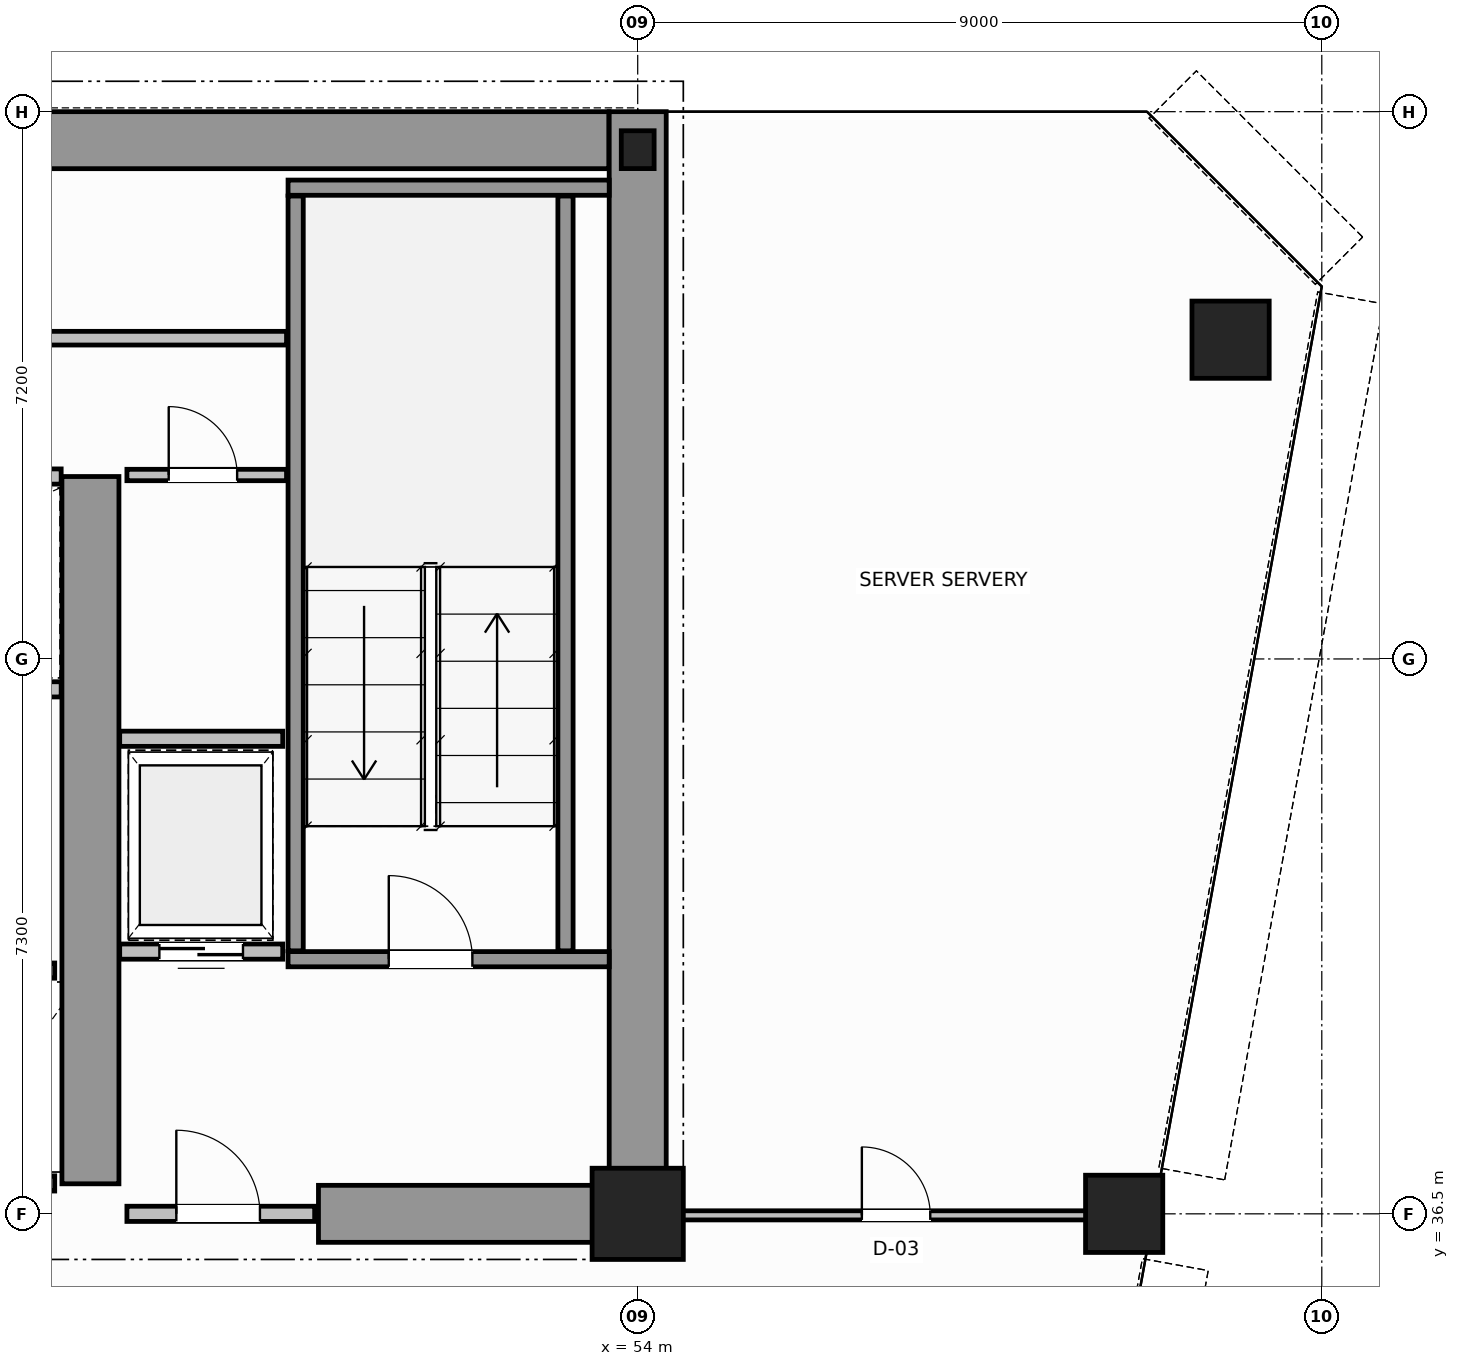
"""IFC4 building model, lengths in metres.
Left out: names, types, materials, properties, quantities, classifications, styles, units other than length and angle.
Written with IfcOpenShell. Run it as: python <this file> out.ifc"""

import sys

from ifc_helpers import new_model, si_unit, direction, frame, frame_2d, origin, origin_2d, place, context, subcontext, project, spatial, rectangle, hollow_circle, i_section, extrude, source, transform, mapped, element, fill, save


model = new_model("IFC4")
c1 = context("Model", 3, precision=1e-05, world=origin(), true_north=direction((0.0, 1.0)))
c2 = subcontext(c1, "Body", "Model", "MODEL_VIEW")
j1 = project(units=[si_unit("LENGTHUNIT", "METRE"), si_unit("PLANEANGLEUNIT", "RADIAN")], contexts=[c1])
p1 = place(None, origin())
s1 = spatial("IfcSite", under=j1, at=p1, CompositionType="ELEMENT")
p2 = place(p1, origin())
s2 = spatial("IfcBuilding", under=s1, at=p2, CompositionType="ELEMENT")
p3 = place(p2, frame((0.0, 0.0, 145.2)))
s3 = spatial("IfcBuildingStorey", under=s2, at=p3, CompositionType="ELEMENT", Elevation=145.2)
m1 = source(origin(), c2, "Body", "SweptSolid", [
    extrude(rectangle(XDim=1.2, YDim=1.2, at=origin_2d()), origin(), (0.0, 0.0, 1.0), 3.8),
])
p4 = place(p3, frame((54.0, 36.5, 0.0), z_axis=(0.0, 0.0, 1.0), x_axis=(1.0, 0.0, 0.0)))
e1 = element("IfcColumn", 1, at=p4, inside=s3, PredefinedType="COLUMN", context=c2, shape_type="MappedRepresentation", body=[
    mapped(m1, transform((0.0, 0.0, 0.0), scale=1.0)),
])
m2 = source(origin(), c2, "Body", "SweptSolid", [
    extrude(i_section(OverallWidth=0.432, OverallDepth=0.498, WebThickness=0.055, FlangeThickness=0.068, FilletRadius=0.015, at=origin_2d()), origin(), (0.0, 0.0, 1.0), 3.8),
])
p5 = place(p3, frame((54.0, 50.5, 0.0), z_axis=(0.0, 0.0, 1.0), x_axis=(1.0, 0.0, 0.0)))
e2 = element("IfcColumn", 2, at=p5, inside=s3, PredefinedType="COLUMN", context=c2, shape_type="MappedRepresentation", body=[
    mapped(m2, transform((0.0, 0.0, 0.0), scale=1.0)),
])
m3 = source(origin(), c2, "Body", "SweptSolid", [
    extrude(hollow_circle(Radius=0.508, WallThickness=0.045, at=origin_2d()), origin(), (0.0, 0.0, 1.0), 3.8),
])
for number, where, z_axis, x_axis in (
    (3, (61.8, 48.0, 0.0), (0.0, 0.0, 1.0), (1.0, 0.0, 0.0)),
    (4, (60.4, 36.5, 0.0), (0.0, 0.0, 1.0), (1.0, 0.0, 0.0)),
):
    element("IfcColumn", number, at=place(p3, frame(where, z_axis=z_axis, x_axis=x_axis)), inside=s3, PredefinedType="COLUMN", context=c2, shape_type="MappedRepresentation", body=[
        mapped(m3, transform((0.0, 0.0, 0.0), scale=1.0)),
    ])
p6 = place(p3, frame((34.002, 50.625, 0.0), z_axis=(0.0, 0.0, 1.0), x_axis=(1.0, 0.0, 0.0)))
e5 = element("IfcWall", 5, at=p6, inside=s3, PredefinedType="SHEAR", context=c2, shape_type="SweptSolid", body=[
    extrude(rectangle(XDim=19.619, YDim=0.75, at=frame_2d((9.81, 0.0))), origin(), (0.0, 0.0, 1.0), 3.8),
])
p7 = place(p3, frame((54.0, 36.5, 0.0), z_axis=(0.0, 0.0, 1.0), x_axis=(0.0, 1.0, 0.0)))
e6 = element("IfcWall", 6, at=p7, inside=s3, PredefinedType="SHEAR", context=c2, shape_type="SweptSolid", body=[
    extrude(rectangle(XDim=14.5, YDim=0.75, at=frame_2d((7.25, 0.0))), origin(), (0.0, 0.0, 1.0), 3.8),
])
p8 = place(p3, frame((49.8, 36.5, 0.0), z_axis=(0.0, 0.0, 1.0), x_axis=(1.0, 0.0, 0.0)))
e7 = element("IfcWall", 7, at=p8, inside=s3, PredefinedType="SHEAR", context=c2, shape_type="SweptSolid", body=[
    extrude(rectangle(XDim=3.805, YDim=0.75, at=frame_2d((1.902, 0.0))), origin(), (0.0, 0.0, 1.0), 2.34),
])
p9 = place(p3, frame((46.8, 36.895, 0.0), z_axis=(0.0, 0.0, 1.0), x_axis=(0.0, 1.0, 0.0)))
e8 = element("IfcWall", 8, at=p9, inside=s3, PredefinedType="SHEAR", context=c2, shape_type="SweptSolid", body=[
    extrude(rectangle(XDim=9.305, YDim=0.75, at=frame_2d((4.652, 0.0))), origin(), (0.0, 0.0, 1.0), 3.8),
])
p10 = place(p3, frame((49.4, 39.85, 0.0), z_axis=(0.0, 0.0, 1.0), x_axis=(1.0, 0.0, 0.0)))
e9 = element("IfcWall", 9, at=p10, inside=s3, PredefinedType="SOLIDWALL", context=c2, shape_type="SweptSolid", body=[
    extrude(rectangle(XDim=4.225, YDim=0.2, at=frame_2d((2.113, 0.0))), origin(), (0.0, 0.0, 1.0), 3.8),
])
p11 = place(p10, frame((1.325, 0.0, 0.0)))
e10 = element("IfcOpeningElement", 10, at=p11, cuts=e9, PredefinedType="OPENING", context=c2, shape_type="SweptSolid", body=[
    extrude(rectangle(XDim=1.1, YDim=2.15, at=frame_2d((0.55, 1.075))), frame((0.0, 0.11, 0.0), z_axis=(0.0, -1.0, 0.0), x_axis=(1.0, 0.0, 0.0)), (0.0, 0.0, 1.0), 0.22),
])
p12 = place(p3, frame((49.4, 50.0, 0.0), z_axis=(0.0, 0.0, 1.0), x_axis=(1.0, 0.0, 0.0)))
e11 = element("IfcWall", 11, at=p12, inside=s3, PredefinedType="SOLIDWALL", context=c2, shape_type="SweptSolid", body=[
    extrude(rectangle(XDim=4.225, YDim=0.2, at=frame_2d((2.113, 0.0))), origin(), (0.0, 0.0, 1.0), 3.8),
])
for number, where, z_axis, x_axis in (
    (12, (49.5, 39.96, 0.0), (0.0, 0.0, 1.0), (0.0, 1.0, 0.0)),
    (13, (53.05, 39.96, 0.0), (0.0, 0.0, 1.0), (0.0, 1.0, 0.0)),
):
    element("IfcWall", number, at=place(p3, frame(where, z_axis=z_axis, x_axis=x_axis)), inside=s3, PredefinedType="SOLIDWALL", context=c2, shape_type="SweptSolid", body=[
        extrude(rectangle(XDim=9.93, YDim=0.2, at=frame_2d((4.965, 0.0))), origin(), (0.0, 0.0, 1.0), 3.8),
    ])
p13 = place(p3, frame((47.28, 36.5, 0.0), z_axis=(0.0, 0.0, 1.0), x_axis=(1.0, 0.0, 0.0)))
e14 = element("IfcWall", 14, at=p13, inside=s3, PredefinedType="SOLIDWALL", context=c2, shape_type="SweptSolid", body=[
    extrude(rectangle(XDim=2.47, YDim=0.2, at=frame_2d((1.235, 0.0))), origin(), (0.0, 0.0, 1.0), 2.33),
])
p14 = place(p13, frame((0.65, 0.0, 0.0)))
e15 = element("IfcOpeningElement", 15, at=p14, cuts=e14, PredefinedType="OPENING", context=c2, shape_type="SweptSolid", body=[
    extrude(rectangle(XDim=1.1, YDim=2.15, at=frame_2d((0.55, 1.075))), frame((0.0, 0.11, 0.0), z_axis=(0.0, -1.0, 0.0), x_axis=(1.0, 0.0, 0.0)), (0.0, 0.0, 1.0), 0.22),
])
p15 = place(p3, frame((44.37, 39.7, 0.0), z_axis=(0.0, 0.0, 1.0), x_axis=(1.0, 0.0, 0.0)))
e16 = element("IfcWall", 16, at=p15, inside=s3, PredefinedType="SOLIDWALL", context=c2, shape_type="SweptSolid", body=[
    extrude(rectangle(XDim=1.96, YDim=0.2, at=frame_2d((0.98, 0.0))), origin(), (0.0, 0.0, 1.0), 3.54),
])
p16 = place(p3, frame((44.37, 36.9, 0.0), z_axis=(0.0, 0.0, 1.0), x_axis=(1.0, 0.0, 0.0)))
e17 = element("IfcWall", 17, at=p16, inside=s3, PredefinedType="SOLIDWALL", context=c2, shape_type="SweptSolid", body=[
    extrude(rectangle(XDim=1.96, YDim=0.2, at=frame_2d((0.98, 0.0))), origin(), (0.0, 0.0, 1.0), 2.33),
])
for number, where, z_axis, x_axis in (
    (18, (44.62, 43.4, 0.0), (0.0, 0.0, 1.0), (1.0, 0.0, 0.0)),
    (19, (44.62, 46.2, 0.0), (0.0, 0.0, 1.0), (1.0, 0.0, 0.0)),
):
    element("IfcWall", number, at=place(p3, frame(where, z_axis=z_axis, x_axis=x_axis)), inside=s3, PredefinedType="SOLIDWALL", context=c2, shape_type="SweptSolid", body=[
        extrude(rectangle(XDim=1.795, YDim=0.2, at=frame_2d((0.897, 0.0))), origin(), (0.0, 0.0, 1.0), 3.54),
    ])
p17 = place(p3, frame((47.185, 39.95, 0.0), z_axis=(0.0, 0.0, 1.0), x_axis=(1.0, 0.0, 0.0)))
e20 = element("IfcWall", 20, at=p17, inside=s3, PredefinedType="SOLIDWALL", context=c2, shape_type="SweptSolid", body=[
    extrude(rectangle(XDim=2.145, YDim=0.2, at=frame_2d((1.073, 0.0))), origin(), (0.0, 0.0, 1.0), 3.54),
])
p18 = place(p17, frame((0.522, 0.0, 0.0)))
e21 = element("IfcOpeningElement", 21, at=p18, cuts=e20, PredefinedType="OPENING", context=c2, shape_type="SweptSolid", body=[
    extrude(rectangle(XDim=1.1, YDim=2.15, at=frame_2d((0.55, 1.075))), frame((0.0, 0.11, 0.0), z_axis=(0.0, -1.0, 0.0), x_axis=(1.0, 0.0, 0.0)), (0.0, 0.0, 1.0), 0.22),
])
p19 = place(p3, frame((47.185, 42.75, 0.0), z_axis=(0.0, 0.0, 1.0), x_axis=(1.0, 0.0, 0.0)))
e22 = element("IfcWall", 22, at=p19, inside=s3, PredefinedType="SOLIDWALL", context=c2, shape_type="SweptSolid", body=[
    extrude(rectangle(XDim=2.145, YDim=0.2, at=frame_2d((1.073, 0.0))), origin(), (0.0, 0.0, 1.0), 3.54),
])
p20 = place(p3, frame((47.28, 46.22, 0.0), z_axis=(0.0, 0.0, 1.0), x_axis=(1.0, 0.0, 0.0)))
e23 = element("IfcWall", 23, at=p20, inside=s3, PredefinedType="PARTITIONING", context=c2, shape_type="SweptSolid", body=[
    extrude(rectangle(XDim=2.1, YDim=0.15, at=frame_2d((1.05, 0.0))), origin(), (0.0, 0.0, 1.0), 3.54),
])
p21 = place(p20, frame((0.55, 0.0, 0.0)))
e24 = element("IfcOpeningElement", 24, at=p21, cuts=e23, PredefinedType="OPENING", context=c2, shape_type="SweptSolid", body=[
    extrude(rectangle(XDim=0.9, YDim=2.1, at=frame_2d((0.45, 1.05))), frame((0.0, 0.085, 0.0), z_axis=(0.0, -1.0, 0.0), x_axis=(1.0, 0.0, 0.0)), (0.0, 0.0, 1.0), 0.17),
])
p22 = place(p3, frame((18.62, 48.02, 0.0), z_axis=(0.0, 0.0, 1.0), x_axis=(1.0, 0.0, 0.0)))
e25 = element("IfcWall", 25, at=p22, inside=s3, PredefinedType="PLUMBINGWALL", context=c2, shape_type="SweptSolid", body=[
    extrude(rectangle(XDim=30.76, YDim=0.18, at=frame_2d((15.38, 0.0))), origin(), (0.0, 0.0, 1.0), 3.54),
])
p23 = place(p22, frame((1.955, 0.0, 0.0)))
e26 = element("IfcOpeningElement", 26, at=p23, cuts=e25, PredefinedType="OPENING", context=c2, shape_type="SweptSolid", body=[
    extrude(rectangle(XDim=0.9, YDim=2.15, at=frame_2d((0.45, 1.075))), frame((0.0, 0.1, 0.0), z_axis=(0.0, -1.0, 0.0), x_axis=(1.0, 0.0, 0.0)), (0.0, 0.0, 1.0), 0.2),
])
p24 = place(p22, frame((8.03, 0.0, 0.0)))
e27 = element("IfcOpeningElement", 27, at=p24, cuts=e25, PredefinedType="OPENING", context=c2, shape_type="SweptSolid", body=[
    extrude(rectangle(XDim=0.9, YDim=2.15, at=frame_2d((0.45, 1.075))), frame((0.0, 0.1, 0.0), z_axis=(0.0, -1.0, 0.0), x_axis=(1.0, 0.0, 0.0)), (0.0, 0.0, 1.0), 0.2),
])
p25 = place(p22, frame((16.93, 0.0, 0.0)))
e28 = element("IfcOpeningElement", 28, at=p25, cuts=e25, PredefinedType="OPENING", context=c2, shape_type="SweptSolid", body=[
    extrude(rectangle(XDim=0.9, YDim=2.15, at=frame_2d((0.45, 1.075))), frame((0.0, 0.1, 0.0), z_axis=(0.0, -1.0, 0.0), x_axis=(1.0, 0.0, 0.0)), (0.0, 0.0, 1.0), 0.2),
])
p26 = place(p22, frame((26.205, 0.0, 0.0)))
e29 = element("IfcOpeningElement", 29, at=p26, cuts=e25, PredefinedType="OPENING", context=c2, shape_type="SweptSolid", body=[
    extrude(rectangle(XDim=0.9, YDim=2.15, at=frame_2d((0.45, 1.075))), frame((0.0, 0.1, 0.0), z_axis=(0.0, -1.0, 0.0), x_axis=(1.0, 0.0, 0.0)), (0.0, 0.0, 1.0), 0.2),
])
p27 = place(p3, frame((54.06, 36.48, 0.0), z_axis=(0.0, 0.0, 1.0), x_axis=(1.0, 0.0, 0.0)))
e30 = element("IfcWall", 30, at=p27, inside=s3, PredefinedType="PARTITIONING", context=c2, shape_type="SweptSolid", body=[
    extrude(rectangle(XDim=6.678, YDim=0.12, at=frame_2d((3.339, 0.0))), origin(), (0.0, 0.0, 1.0), 2.83),
])
p28 = place(p27, frame((2.889, 0.0, 0.0)))
e31 = element("IfcOpeningElement", 31, at=p28, cuts=e30, PredefinedType="OPENING", context=c2, shape_type="SweptSolid", body=[
    extrude(rectangle(XDim=0.9, YDim=2.15, at=frame_2d((0.45, 1.075))), frame((0.0, 0.07, 0.0), z_axis=(0.0, -1.0, 0.0), x_axis=(1.0, 0.0, 0.0)), (0.0, 0.0, 1.0), 0.14),
])
m4 = source(origin(), c2, "Body", "SweptSolid", [
    extrude(rectangle(XDim=1.1, YDim=2.15, at=frame_2d((0.55, 1.075))), frame((0.0, 0.025, 0.0), z_axis=(0.0, -1.0, 0.0), x_axis=(1.0, 0.0, 0.0)), (0.0, 0.0, 1.0), 0.05),
])
p29 = place(p11, origin())
e32 = element("IfcDoor", 32, at=p29, inside=s3, OperationType="SINGLE_SWING_RIGHT", PredefinedType="DOOR", context=c2, shape_type="MappedRepresentation", body=[
    mapped(m4, transform((0.0, 0.0, 0.0), scale=1.0)),
])
fill(e10, e32)
p30 = place(p14, origin())
e33 = element("IfcDoor", 33, at=p30, inside=s3, OperationType="SINGLE_SWING_LEFT", PredefinedType="DOOR", context=c2, shape_type="MappedRepresentation", body=[
    mapped(m4, transform((0.0, 0.0, 0.0), scale=1.0)),
])
fill(e15, e33)
p31 = place(p18, origin())
e34 = element("IfcDoor", 34, at=p31, inside=s3, OperationType="DOUBLE_DOOR_SLIDING", PredefinedType="DOOR", context=c2, shape_type="MappedRepresentation", body=[
    mapped(m4, transform((0.0, 0.0, 0.0), scale=1.0)),
])
fill(e21, e34)
m5 = source(origin(), c2, "Body", "SweptSolid", [
    extrude(rectangle(XDim=0.9, YDim=2.1, at=frame_2d((0.45, 1.05))), frame((0.0, 0.025, 0.0), z_axis=(0.0, -1.0, 0.0), x_axis=(1.0, 0.0, 0.0)), (0.0, 0.0, 1.0), 0.05),
])
p32 = place(p21, origin())
e35 = element("IfcDoor", 35, at=p32, inside=s3, OperationType="SINGLE_SWING_RIGHT", PredefinedType="DOOR", context=c2, shape_type="MappedRepresentation", body=[
    mapped(m5, transform((0.0, 0.0, 0.0), scale=1.0)),
])
fill(e24, e35)
m6 = source(origin(), c2, "Body", "SweptSolid", [
    extrude(rectangle(XDim=0.9, YDim=2.15, at=frame_2d((0.45, 1.075))), frame((0.0, 0.025, 0.0), z_axis=(0.0, -1.0, 0.0), x_axis=(1.0, 0.0, 0.0)), (0.0, 0.0, 1.0), 0.05),
])
p33 = place(p28, origin())
e36 = element("IfcDoor", 36, at=p33, inside=s3, OperationType="SINGLE_SWING_RIGHT", PredefinedType="DOOR", context=c2, shape_type="MappedRepresentation", body=[
    mapped(m6, transform((0.0, 0.0, 0.0), scale=1.0)),
])
fill(e31, e36)
save(model, sys.argv[1])
